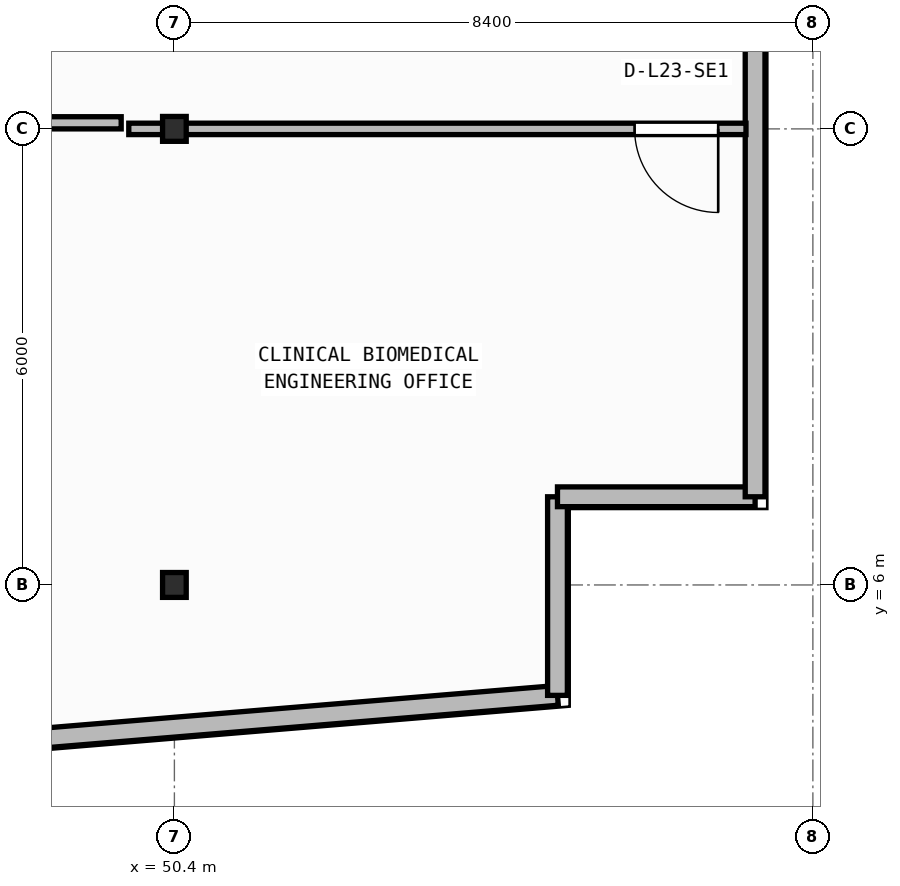
"""IFC4 building model, lengths in metres.
Left out: names, types, materials, properties, quantities, classifications, styles, units other than length and angle.
Written with IfcOpenShell. Run it as: python <this file> out.ifc"""

import sys

from ifc_helpers import new_model, si_unit, direction, frame, frame_2d, origin, origin_2d, place, context, subcontext, project, spatial, rectangle, i_section, extrude, element, fill, save


model = new_model("IFC4")
c1 = context("Model", 3, precision=1e-05, world=origin(), true_north=direction((0.0, 1.0)))
c2 = subcontext(c1, "Body", "Model", "MODEL_VIEW")
j1 = project(units=[si_unit("LENGTHUNIT", "METRE"), si_unit("PLANEANGLEUNIT", "RADIAN")], contexts=[c1])
p1 = place(None, origin())
s1 = spatial("IfcSite", under=j1, at=p1, CompositionType="ELEMENT")
p2 = place(p1, origin())
s2 = spatial("IfcBuilding", under=s1, at=p2, CompositionType="ELEMENT")
p3 = place(p2, frame((0.0, 0.0, 93.6)))
s3 = spatial("IfcBuildingStorey", under=s2, at=p3, CompositionType="ELEMENT", Elevation=93.6)
for number, where, z_axis, x_axis in (
    (1, (50.4, 6.0, 0.0), (0.0, 0.0, 1.0), (1.0, 0.0, 0.0)),
    (2, (50.4, 12.0, 0.0), (0.0, 0.0, 1.0), (1.0, 0.0, 0.0)),
):
    element("IfcColumn", number, at=place(p3, frame(where, z_axis=z_axis, x_axis=x_axis)), inside=s3, PredefinedType="COLUMN", context=c2, shape_type="SweptSolid", body=[
        extrude(i_section(OverallWidth=0.311, OverallDepth=0.327, WebThickness=0.016, FlangeThickness=0.025, FilletRadius=0.017, at=origin_2d()), origin(), (0.0, 0.0, 1.0), 3.95),
    ])
p4 = place(p3, frame((2.76, 0.174, 0.0), z_axis=(0.0, 0.0, 1.0), x_axis=(0.996571478456, 0.082736257641, 0.0)))
e3 = element("IfcWall", 3, at=p4, inside=s3, PredefinedType="STANDARD", context=c2, shape_type="SweptSolid", body=[
    extrude(rectangle(XDim=52.861, YDim=0.26, at=frame_2d((26.431, 0.0))), origin(), (0.0, 0.0, 1.0), 3.67),
])
p5 = place(p4, frame((25.231, 0.0, 0.9)))
e4 = element("IfcOpeningElement", 4, at=p5, cuts=e3, PredefinedType="OPENING", context=c2, shape_type="SweptSolid", body=[
    extrude(rectangle(XDim=2.4, YDim=1.65, at=frame_2d((1.2, 0.825))), frame((0.0, 0.14, 0.0), z_axis=(0.0, -1.0, 0.0), x_axis=(1.0, 0.0, 0.0)), (0.0, 0.0, 1.0), 0.28),
])
p6 = place(p3, frame((55.44, 4.547, 0.0), z_axis=(0.0, 0.0, 1.0), x_axis=(0.0, 1.0, 0.0)))
e5 = element("IfcWall", 5, at=p6, inside=s3, PredefinedType="STANDARD", context=c2, shape_type="SweptSolid", body=[
    extrude(rectangle(XDim=2.613, YDim=0.26, at=frame_2d((1.306, 0.0))), origin(), (0.0, 0.0, 1.0), 3.67),
])
p7 = place(p3, frame((55.44, 7.16, 0.0), z_axis=(0.0, 0.0, 1.0), x_axis=(1.0, 0.0, 0.0)))
e6 = element("IfcWall", 6, at=p7, inside=s3, PredefinedType="STANDARD", context=c2, shape_type="SweptSolid", body=[
    extrude(rectangle(XDim=2.6, YDim=0.26, at=frame_2d((1.3, 0.0))), origin(), (0.0, 0.0, 1.0), 3.67),
])
p8 = place(p3, frame((58.04, 7.16, 0.0), z_axis=(0.0, 0.0, 1.0), x_axis=(0.0, 1.0, 0.0)))
e7 = element("IfcWall", 7, at=p8, inside=s3, PredefinedType="STANDARD", context=c2, shape_type="SweptSolid", body=[
    extrude(rectangle(XDim=24.48, YDim=0.26, at=frame_2d((12.24, 0.0))), origin(), (0.0, 0.0, 1.0), 3.67),
])
p9 = place(p8, frame((11.59, 0.0, 0.0)))
e8 = element("IfcOpeningElement", 8, at=p9, cuts=e7, PredefinedType="OPENING", context=c2, shape_type="SweptSolid", body=[
    extrude(rectangle(XDim=1.3, YDim=2.15, at=frame_2d((0.65, 1.075))), frame((0.0, 0.14, 0.0), z_axis=(0.0, -1.0, 0.0), x_axis=(1.0, 0.0, 0.0)), (0.0, 0.0, 1.0), 0.28),
])
p10 = place(p3, frame((57.92, 12.0, 0.0), z_axis=(0.0, 0.0, 1.0), x_axis=(-1.0, 0.0, 0.0)))
e9 = element("IfcWall", 9, at=p10, inside=s3, PredefinedType="PARTITIONING", context=c2, shape_type="SweptSolid", body=[
    extrude(rectangle(XDim=8.12, YDim=0.15, at=frame_2d((4.06, 0.0))), origin(), (0.0, 0.0, 1.0), 3.033),
])
p11 = place(p10, frame((0.365, 0.0, 0.0)))
e10 = element("IfcOpeningElement", 10, at=p11, cuts=e9, PredefinedType="OPENING", context=c2, shape_type="SweptSolid", body=[
    extrude(rectangle(XDim=1.1, YDim=2.1, at=frame_2d((0.55, 1.05))), frame((0.0, 0.085, 0.0), z_axis=(0.0, -1.0, 0.0), x_axis=(1.0, 0.0, 0.0)), (0.0, 0.0, 1.0), 0.17),
])
p12 = place(p3, frame((46.689, 12.08, 0.0), z_axis=(0.0, 0.0, 1.0), x_axis=(1.0, 0.0, 0.0)))
e11 = element("IfcWall", 11, at=p12, inside=s3, PredefinedType="PARTITIONING", context=c2, shape_type="SweptSolid", body=[
    extrude(rectangle(XDim=3.011, YDim=0.16, at=frame_2d((1.505, 0.0))), origin(), (0.0, 0.0, 1.0), 3.033),
])
p13 = place(p11, origin())
e12 = element("IfcDoor", 12, at=p13, inside=s3, OperationType="SINGLE_SWING_LEFT", PredefinedType="DOOR", context=c2, shape_type="SweptSolid", body=[
    extrude(rectangle(XDim=1.1, YDim=2.1, at=frame_2d((0.55, 1.05))), frame((0.0, 0.025, 0.0), z_axis=(0.0, -1.0, 0.0), x_axis=(1.0, 0.0, 0.0)), (0.0, 0.0, 1.0), 0.05),
])
fill(e10, e12)
save(model, sys.argv[1])
